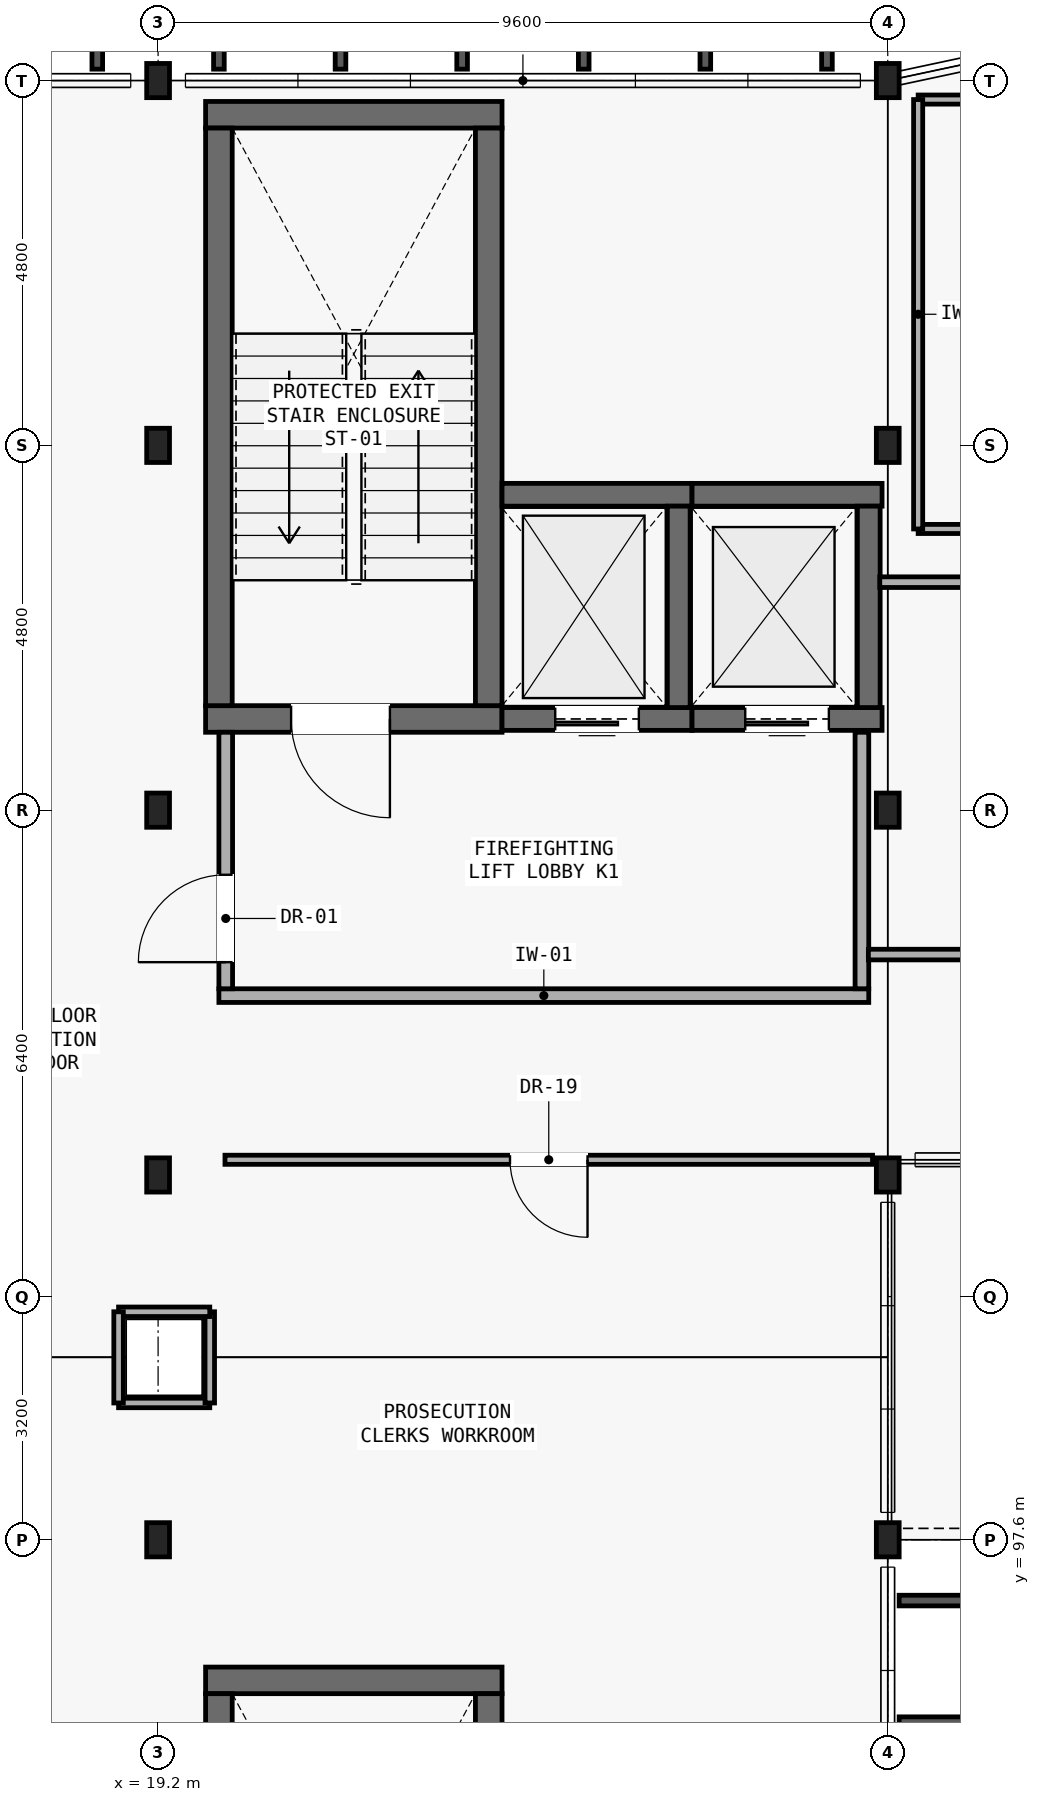
"""IFC4 building model, lengths in metres.
Left out: names, types, materials, properties, quantities, classifications, styles, units other than length and angle.
Written with IfcOpenShell. Run it as: python <this file> out.ifc"""

import sys

from ifc_helpers import new_model, si_unit, direction, frame, frame_2d, origin, origin_2d, place, context, subcontext, project, spatial, rectangle, i_section, extrude, element, fill, save


model = new_model("IFC4")
c1 = context("Model", 3, precision=1e-05, world=origin(), true_north=direction((0.0, 1.0)))
c2 = subcontext(c1, "Body", "Model", "MODEL_VIEW")
j1 = project(units=[si_unit("LENGTHUNIT", "METRE"), si_unit("PLANEANGLEUNIT", "RADIAN")], contexts=[c1])
p1 = place(None, origin())
s1 = spatial("IfcSite", under=j1, at=p1, CompositionType="ELEMENT")
p2 = place(p1, origin())
s2 = spatial("IfcBuilding", under=s1, at=p2, CompositionType="ELEMENT")
p3 = place(p2, frame((0.0, 0.0, 22.05)))
s3 = spatial("IfcBuildingStorey", under=s2, at=p3, CompositionType="ELEMENT", Elevation=22.05)
for number, where, z_axis, x_axis in (
    (1, (28.8, 97.6, 0.0), (0.0, 0.0, 1.0), (1.0, 0.0, 0.0)),
    (2, (28.8, 102.4, 0.0), (0.0, 0.0, 1.0), (1.0, 0.0, 0.0)),
    (3, (28.8, 107.2, 0.0), (0.0, 0.0, 1.0), (1.0, 0.0, 0.0)),
    (4, (28.8, 112.0, 0.0), (0.0, 0.0, 1.0), (1.0, 0.0, 0.0)),
    (5, (28.8, 116.8, 0.0), (0.0, 0.0, 1.0), (1.0, 0.0, 0.0)),
    (6, (19.2, 116.8, 0.0), (0.0, 0.0, 1.0), (1.0, 0.0, 0.0)),
    (7, (19.2, 97.6, 0.0), (0.0, 0.0, 1.0), (1.0, 0.0, 0.0)),
    (8, (19.2, 102.4, 0.0), (0.0, 0.0, 1.0), (1.0, 0.0, 0.0)),
    (9, (19.2, 107.2, 0.0), (0.0, 0.0, 1.0), (1.0, 0.0, 0.0)),
    (10, (19.2, 112.0, 0.0), (0.0, 0.0, 1.0), (1.0, 0.0, 0.0)),
):
    element("IfcColumn", number, at=place(p3, frame(where, z_axis=z_axis, x_axis=x_axis)), inside=s3, PredefinedType="COLUMN", context=c2, shape_type="SweptSolid", body=[
        extrude(i_section(OverallWidth=0.3, OverallDepth=0.45, WebThickness=0.014, FlangeThickness=0.026, FilletRadius=0.027, at=origin_2d()), origin(), (0.0, 0.0, 1.0), 4.2),
    ])
p4 = place(p3, frame((19.825, 108.4, 0.0), z_axis=(0.0, 0.0, 1.0), x_axis=(1.0, 0.0, 0.0)))
e11 = element("IfcWall", 11, at=p4, inside=s3, PredefinedType="SHEAR", context=c2, shape_type="SweptSolid", body=[
    extrude(rectangle(XDim=3.9, YDim=0.35, at=frame_2d((1.95, 0.0))), origin(), (0.0, 0.0, 1.0), 4.0),
])
p5 = place(p4, frame((1.125, 0.0, 0.0)))
e12 = element("IfcOpeningElement", 12, at=p5, cuts=e11, PredefinedType="OPENING", context=c2, shape_type="SweptSolid", body=[
    extrude(rectangle(XDim=1.3, YDim=2.15, at=frame_2d((0.65, 1.075))), frame((0.0, 0.185, 0.0), z_axis=(0.0, -1.0, 0.0), x_axis=(1.0, 0.0, 0.0)), (0.0, 0.0, 1.0), 0.37),
])
p6 = place(p3, frame((19.825, 116.35, 0.0), z_axis=(0.0, 0.0, 1.0), x_axis=(1.0, 0.0, 0.0)))
e13 = element("IfcWall", 13, at=p6, inside=s3, PredefinedType="SHEAR", context=c2, shape_type="SweptSolid", body=[
    extrude(rectangle(XDim=3.9, YDim=0.35, at=frame_2d((1.95, 0.0))), origin(), (0.0, 0.0, 1.0), 4.0),
])
for number, where, z_axis, x_axis in (
    (14, (20.0, 108.575, 0.0), (0.0, 0.0, 1.0), (0.0, 1.0, 0.0)),
    (15, (23.55, 108.575, 0.0), (0.0, 0.0, 1.0), (0.0, 1.0, 0.0)),
):
    element("IfcWall", number, at=place(p3, frame(where, z_axis=z_axis, x_axis=x_axis)), inside=s3, PredefinedType="SHEAR", context=c2, shape_type="SweptSolid", body=[
        extrude(rectangle(XDim=7.6, YDim=0.35, at=frame_2d((3.8, 0.0))), origin(), (0.0, 0.0, 1.0), 4.0),
    ])
p7 = place(p3, frame((23.725, 108.4, 0.0), z_axis=(0.0, 0.0, 1.0), x_axis=(1.0, 0.0, 0.0)))
e16 = element("IfcWall", 16, at=p7, inside=s3, PredefinedType="SHEAR", context=c2, shape_type="SweptSolid", body=[
    extrude(rectangle(XDim=2.5, YDim=0.3, at=frame_2d((1.25, 0.0))), origin(), (0.0, 0.0, 1.0), 4.0),
])
p8 = place(p7, frame((0.7, 0.0, 0.0)))
e17 = element("IfcOpeningElement", 17, at=p8, cuts=e16, PredefinedType="OPENING", context=c2, shape_type="SweptSolid", body=[
    extrude(rectangle(XDim=1.1, YDim=2.1, at=frame_2d((0.55, 1.05))), frame((0.0, 0.16, 0.0), z_axis=(0.0, -1.0, 0.0), x_axis=(1.0, 0.0, 0.0)), (0.0, 0.0, 1.0), 0.32),
])
p9 = place(p3, frame((23.725, 111.35, 0.0), z_axis=(0.0, 0.0, 1.0), x_axis=(1.0, 0.0, 0.0)))
e18 = element("IfcWall", 18, at=p9, inside=s3, PredefinedType="SHEAR", context=c2, shape_type="SweptSolid", body=[
    extrude(rectangle(XDim=2.5, YDim=0.3, at=frame_2d((1.25, 0.0))), origin(), (0.0, 0.0, 1.0), 4.0),
])
p10 = place(p3, frame((26.05, 108.55, 0.0), z_axis=(0.0, 0.0, 1.0), x_axis=(0.0, 1.0, 0.0)))
e19 = element("IfcWall", 19, at=p10, inside=s3, PredefinedType="SHEAR", context=c2, shape_type="SweptSolid", body=[
    extrude(rectangle(XDim=2.65, YDim=0.3, at=frame_2d((1.325, 0.0))), origin(), (0.0, 0.0, 1.0), 4.0),
])
p11 = place(p3, frame((26.225, 108.4, 0.0), z_axis=(0.0, 0.0, 1.0), x_axis=(1.0, 0.0, 0.0)))
e20 = element("IfcWall", 20, at=p11, inside=s3, PredefinedType="SHEAR", context=c2, shape_type="SweptSolid", body=[
    extrude(rectangle(XDim=2.5, YDim=0.3, at=frame_2d((1.25, 0.0))), origin(), (0.0, 0.0, 1.0), 4.0),
])
p12 = place(p11, frame((0.7, 0.0, 0.0)))
e21 = element("IfcOpeningElement", 21, at=p12, cuts=e20, PredefinedType="OPENING", context=c2, shape_type="SweptSolid", body=[
    extrude(rectangle(XDim=1.1, YDim=2.1, at=frame_2d((0.55, 1.05))), frame((0.0, 0.16, 0.0), z_axis=(0.0, -1.0, 0.0), x_axis=(1.0, 0.0, 0.0)), (0.0, 0.0, 1.0), 0.32),
])
p13 = place(p3, frame((26.225, 111.35, 0.0), z_axis=(0.0, 0.0, 1.0), x_axis=(1.0, 0.0, 0.0)))
e22 = element("IfcWall", 22, at=p13, inside=s3, PredefinedType="SHEAR", context=c2, shape_type="SweptSolid", body=[
    extrude(rectangle(XDim=2.5, YDim=0.3, at=frame_2d((1.25, 0.0))), origin(), (0.0, 0.0, 1.0), 4.0),
])
p14 = place(p3, frame((28.55, 108.55, 0.0), z_axis=(0.0, 0.0, 1.0), x_axis=(0.0, 1.0, 0.0)))
e23 = element("IfcWall", 23, at=p14, inside=s3, PredefinedType="SHEAR", context=c2, shape_type="SweptSolid", body=[
    extrude(rectangle(XDim=2.65, YDim=0.3, at=frame_2d((1.325, 0.0))), origin(), (0.0, 0.0, 1.0), 4.0),
])
p15 = place(p3, frame((20.0, 104.76, 0.0), z_axis=(0.0, 0.0, 1.0), x_axis=(1.0, 0.0, 0.0)))
e24 = element("IfcWall", 24, at=p15, inside=s3, PredefinedType="PARTITIONING", context=c2, shape_type="SweptSolid", body=[
    extrude(rectangle(XDim=8.55, YDim=0.18, at=frame_2d((4.275, 0.0))), origin(), (0.0, 0.0, 1.0), 3.48),
])
p16 = place(p3, frame((20.09, 104.85, 0.0), z_axis=(0.0, 0.0, 1.0), x_axis=(0.0, 1.0, 0.0)))
e25 = element("IfcWall", 25, at=p16, inside=s3, PredefinedType="PARTITIONING", context=c2, shape_type="SweptSolid", body=[
    extrude(rectangle(XDim=3.375, YDim=0.18, at=frame_2d((1.688, 0.0))), origin(), (0.0, 0.0, 1.0), 4.0),
])
p17 = place(p16, frame((0.35, 0.0, 0.0)))
e26 = element("IfcOpeningElement", 26, at=p17, cuts=e25, PredefinedType="OPENING", context=c2, shape_type="SweptSolid", body=[
    extrude(rectangle(XDim=1.15, YDim=2.15, at=frame_2d((0.575, 1.075))), frame((0.0, 0.1, 0.0), z_axis=(0.0, -1.0, 0.0), x_axis=(1.0, 0.0, 0.0)), (0.0, 0.0, 1.0), 0.2),
])
p18 = place(p3, frame((28.46, 104.85, 0.0), z_axis=(0.0, 0.0, 1.0), x_axis=(0.0, 1.0, 0.0)))
e27 = element("IfcWall", 27, at=p18, inside=s3, PredefinedType="PARTITIONING", context=c2, shape_type="SweptSolid", body=[
    extrude(rectangle(XDim=3.375, YDim=0.18, at=frame_2d((1.688, 0.0))), origin(), (0.0, 0.0, 1.0), 4.0),
])
p19 = place(p3, frame((19.825, 95.75, 0.0), z_axis=(0.0, 0.0, 1.0), x_axis=(1.0, 0.0, 0.0)))
e28 = element("IfcWall", 28, at=p19, inside=s3, PredefinedType="SHEAR", context=c2, shape_type="SweptSolid", body=[
    extrude(rectangle(XDim=3.9, YDim=0.35, at=frame_2d((1.95, 0.0))), origin(), (0.0, 0.0, 1.0), 4.0),
])
for number, where, z_axis, x_axis in (
    (29, (20.0, 87.975, 0.0), (0.0, 0.0, 1.0), (0.0, 1.0, 0.0)),
    (30, (23.55, 87.975, 0.0), (0.0, 0.0, 1.0), (0.0, 1.0, 0.0)),
):
    element("IfcWall", number, at=place(p3, frame(where, z_axis=z_axis, x_axis=x_axis)), inside=s3, PredefinedType="SHEAR", context=c2, shape_type="SweptSolid", body=[
        extrude(rectangle(XDim=7.6, YDim=0.35, at=frame_2d((3.8, 0.0))), origin(), (0.0, 0.0, 1.0), 4.0),
    ])
p20 = place(p3, frame((18.68, 99.4, 0.0), z_axis=(0.0, 0.0, 1.0), x_axis=(1.0, 0.0, 0.0)))
e31 = element("IfcWall", 31, at=p20, inside=s3, PredefinedType="PARTITIONING", context=c2, shape_type="SweptSolid", body=[
    extrude(rectangle(XDim=1.2, YDim=0.125, at=frame_2d((0.6, 0.0))), origin(), (0.0, 0.0, 1.0), 4.0),
])
p21 = place(p3, frame((19.88, 99.4, 0.0), z_axis=(0.0, 0.0, 1.0), x_axis=(0.0, 1.0, 0.0)))
e32 = element("IfcWall", 32, at=p21, inside=s3, PredefinedType="PARTITIONING", context=c2, shape_type="SweptSolid", body=[
    extrude(rectangle(XDim=1.2, YDim=0.125, at=frame_2d((0.6, 0.0))), origin(), (0.0, 0.0, 1.0), 4.0),
])
p22 = place(p3, frame((19.88, 100.6, 0.0), z_axis=(0.0, 0.0, 1.0), x_axis=(-1.0, 0.0, 0.0)))
e33 = element("IfcWall", 33, at=p22, inside=s3, PredefinedType="PARTITIONING", context=c2, shape_type="SweptSolid", body=[
    extrude(rectangle(XDim=1.2, YDim=0.125, at=frame_2d((0.6, 0.0))), origin(), (0.0, 0.0, 1.0), 4.0),
])
p23 = place(p3, frame((18.68, 100.6, 0.0), z_axis=(0.0, 0.0, 1.0), x_axis=(0.0, -1.0, 0.0)))
e34 = element("IfcWall", 34, at=p23, inside=s3, PredefinedType="PARTITIONING", context=c2, shape_type="SweptSolid", body=[
    extrude(rectangle(XDim=1.2, YDim=0.125, at=frame_2d((0.6, 0.0))), origin(), (0.0, 0.0, 1.0), 4.0),
])
p24 = place(p3, frame((28.6, 102.6, 0.0), z_axis=(0.0, 0.0, 1.0), x_axis=(-1.0, 0.0, 0.0)))
e35 = element("IfcWall", 35, at=p24, inside=s3, PredefinedType="PARTITIONING", context=c2, shape_type="SweptSolid", body=[
    extrude(rectangle(XDim=8.52, YDim=0.12, at=frame_2d((4.26, 0.0))), origin(), (0.0, 0.0, 1.0), 3.08),
])
p25 = place(p24, frame((3.75, 0.0, 0.0)))
e36 = element("IfcOpeningElement", 36, at=p25, cuts=e35, PredefinedType="OPENING", context=c2, shape_type="SweptSolid", body=[
    extrude(rectangle(XDim=1.02, YDim=2.1, at=frame_2d((0.51, 1.05))), frame((0.0, 0.07, 0.0), z_axis=(0.0, -1.0, 0.0), x_axis=(1.0, 0.0, 0.0)), (0.0, 0.0, 1.0), 0.14),
])
p26 = place(p3, frame((29.2, 110.9, 0.0), z_axis=(0.0, 0.0, 1.0), x_axis=(1.0, 0.0, 0.0)))
e37 = element("IfcWall", 37, at=p26, inside=s3, PredefinedType="PARTITIONING", context=c2, shape_type="SweptSolid", body=[
    extrude(rectangle(XDim=28.4, YDim=0.12, at=frame_2d((14.2, 0.0))), origin(), (0.0, 0.0, 1.0), 4.0),
])
p27 = place(p26, frame((13.71, 0.0, 0.0)))
e38 = element("IfcOpeningElement", 38, at=p27, cuts=e37, PredefinedType="OPENING", context=c2, shape_type="SweptSolid", body=[
    extrude(rectangle(XDim=0.98, YDim=2.1, at=frame_2d((0.49, 1.05))), frame((0.0, 0.07, 0.0), z_axis=(0.0, -1.0, 0.0), x_axis=(1.0, 0.0, 0.0)), (0.0, 0.0, 1.0), 0.14),
])
p28 = place(p3, frame((57.6, 116.55, 0.0), z_axis=(0.0, 0.0, 1.0), x_axis=(-1.0, 0.0, 0.0)))
e39 = element("IfcWall", 39, at=p28, inside=s3, PredefinedType="PARTITIONING", context=c2, shape_type="SweptSolid", body=[
    extrude(rectangle(XDim=28.4, YDim=0.12, at=frame_2d((14.2, 0.0))), origin(), (0.0, 0.0, 1.0), 3.67),
])
p29 = place(p3, frame((29.2, 116.55, 0.0), z_axis=(0.0, 0.0, 1.0), x_axis=(0.0, -1.0, 0.0)))
e40 = element("IfcWall", 40, at=p29, inside=s3, PredefinedType="PARTITIONING", context=c2, shape_type="SweptSolid", body=[
    extrude(rectangle(XDim=5.65, YDim=0.12, at=frame_2d((2.825, 0.0))), origin(), (0.0, 0.0, 1.0), 4.0),
])
p30 = place(p3, frame((28.545, 105.3, 0.0), z_axis=(0.0, 0.0, 1.0), x_axis=(1.0, 0.0, 0.0)))
e41 = element("IfcWall", 41, at=p30, inside=s3, PredefinedType="PARTITIONING", context=c2, shape_type="SweptSolid", body=[
    extrude(rectangle(XDim=12.855, YDim=0.14, at=frame_2d((6.427, 0.0))), origin(), (0.0, 0.0, 1.0), 3.62),
])
p31 = place(p30, frame((5.837, 0.0, 0.0)))
e42 = element("IfcOpeningElement", 42, at=p31, cuts=e41, PredefinedType="OPENING", context=c2, shape_type="SweptSolid", body=[
    extrude(rectangle(XDim=1.18, YDim=2.1, at=frame_2d((0.59, 1.05))), frame((0.0, 0.08, 0.0), z_axis=(0.0, -1.0, 0.0), x_axis=(1.0, 0.0, 0.0)), (0.0, 0.0, 1.0), 0.16),
])
p32 = place(p3, frame((41.4, 110.2, 0.0), z_axis=(0.0, 0.0, 1.0), x_axis=(-1.0, 0.0, 0.0)))
e43 = element("IfcWall", 43, at=p32, inside=s3, PredefinedType="PARTITIONING", context=c2, shape_type="SweptSolid", body=[
    extrude(rectangle(XDim=12.705, YDim=0.14, at=frame_2d((6.353, 0.0))), origin(), (0.0, 0.0, 1.0), 3.44),
])
p33 = place(p5, frame((1.3, 0.0, 0.0), z_axis=(0.0, 0.0, 1.0), x_axis=(-1.0, 0.0, 0.0)))
e44 = element("IfcDoor", 44, at=p33, inside=s3, OperationType="SINGLE_SWING_RIGHT", PredefinedType="DOOR", context=c2, shape_type="SweptSolid", body=[
    extrude(rectangle(XDim=1.3, YDim=2.15, at=frame_2d((0.65, 1.075))), frame((0.0, 0.025, 0.0), z_axis=(0.0, -1.0, 0.0), x_axis=(1.0, 0.0, 0.0)), (0.0, 0.0, 1.0), 0.05),
])
fill(e12, e44)
p34 = place(p8, frame((1.1, 0.0, 0.0), z_axis=(0.0, 0.0, 1.0), x_axis=(-1.0, 0.0, 0.0)))
e45 = element("IfcDoor", 45, at=p34, inside=s3, OperationType="SLIDING_TO_LEFT", PredefinedType="DOOR", context=c2, shape_type="SweptSolid", body=[
    extrude(rectangle(XDim=1.1, YDim=2.1, at=frame_2d((0.55, 1.05))), frame((0.0, 0.025, 0.0), z_axis=(0.0, -1.0, 0.0), x_axis=(1.0, 0.0, 0.0)), (0.0, 0.0, 1.0), 0.05),
])
fill(e17, e45)
p35 = place(p12, frame((1.1, 0.0, 0.0), z_axis=(0.0, 0.0, 1.0), x_axis=(-1.0, 0.0, 0.0)))
e46 = element("IfcDoor", 46, at=p35, inside=s3, OperationType="SLIDING_TO_LEFT", PredefinedType="DOOR", context=c2, shape_type="SweptSolid", body=[
    extrude(rectangle(XDim=1.1, YDim=2.1, at=frame_2d((0.55, 1.05))), frame((0.0, 0.025, 0.0), z_axis=(0.0, -1.0, 0.0), x_axis=(1.0, 0.0, 0.0)), (0.0, 0.0, 1.0), 0.05),
])
fill(e21, e46)
p36 = place(p17, origin())
e47 = element("IfcDoor", 47, at=p36, inside=s3, OperationType="SINGLE_SWING_LEFT", PredefinedType="DOOR", context=c2, shape_type="SweptSolid", body=[
    extrude(rectangle(XDim=1.15, YDim=2.15, at=frame_2d((0.575, 1.075))), frame((0.0, 0.025, 0.0), z_axis=(0.0, -1.0, 0.0), x_axis=(1.0, 0.0, 0.0)), (0.0, 0.0, 1.0), 0.05),
])
fill(e26, e47)
p37 = place(p25, origin())
e48 = element("IfcDoor", 48, at=p37, inside=s3, OperationType="SINGLE_SWING_LEFT", PredefinedType="DOOR", context=c2, shape_type="SweptSolid", body=[
    extrude(rectangle(XDim=1.02, YDim=2.1, at=frame_2d((0.51, 1.05))), frame((0.0, 0.025, 0.0), z_axis=(0.0, -1.0, 0.0), x_axis=(1.0, 0.0, 0.0)), (0.0, 0.0, 1.0), 0.05),
])
fill(e36, e48)
save(model, sys.argv[1])
